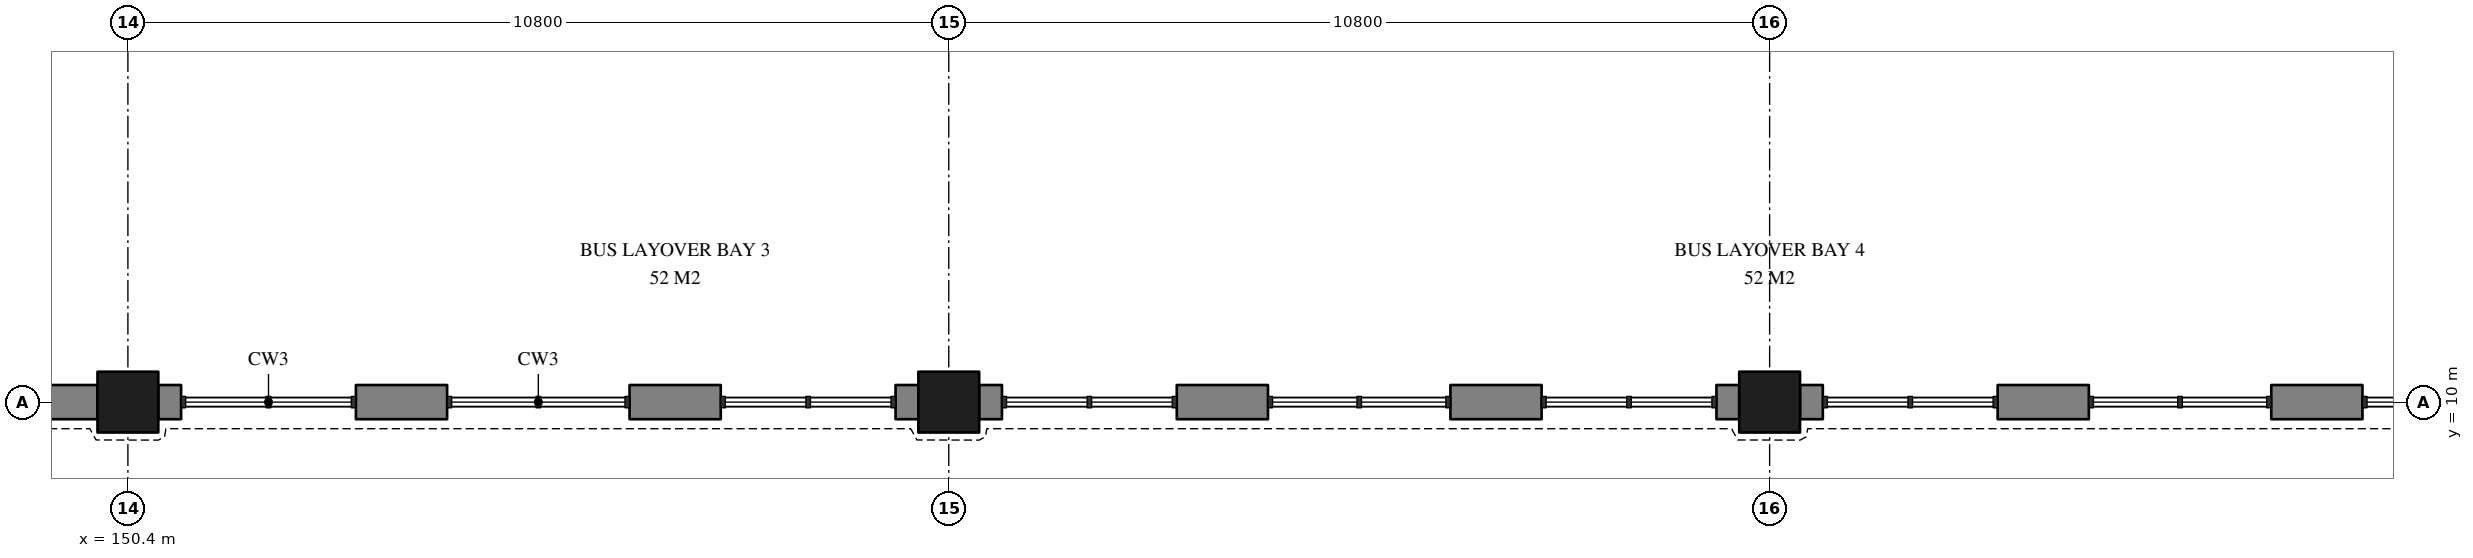
"""IFC4 building model, lengths in metres.
Left out: names, types, materials, properties, quantities, classifications, styles, units other than length and angle.
Written with IfcOpenShell. Run it as: python <this file> out.ifc"""

import sys

from ifc_helpers import new_model, si_unit, direction, frame, frame_2d, origin, origin_2d, place, context, subcontext, project, spatial, rectangle, extrude, element, save


model = new_model("IFC4")
c1 = context("Model", 3, precision=1e-05, world=origin(), true_north=direction((0.0, 1.0)))
c2 = subcontext(c1, "Body", "Model", "MODEL_VIEW")
j1 = project(units=[si_unit("LENGTHUNIT", "METRE"), si_unit("PLANEANGLEUNIT", "RADIAN")], contexts=[c1])
p1 = place(None, origin())
s1 = spatial("IfcSite", under=j1, at=p1, CompositionType="ELEMENT")
p2 = place(p1, origin())
s2 = spatial("IfcBuilding", under=s1, at=p2, CompositionType="ELEMENT")
p3 = place(p2, frame((0.0, 0.0, -5.4)))
s3 = spatial("IfcBuildingStorey", under=s2, at=p3, CompositionType="ELEMENT", Elevation=-5.4)
for number, where, z_axis, x_axis in (
    (1, (150.4, 10.0, -0.4), (0.0, 0.0, 1.0), (1.0, 0.0, 0.0)),
    (2, (161.2, 10.0, -0.4), (0.0, 0.0, 1.0), (1.0, 0.0, 0.0)),
    (3, (172.0, 10.0, -0.4), (0.0, 0.0, 1.0), (1.0, 0.0, 0.0)),
):
    element("IfcColumn", number, at=place(p3, frame(where, z_axis=z_axis, x_axis=x_axis)), inside=s3, PredefinedType="COLUMN", context=c2, shape_type="SweptSolid", body=[
        extrude(rectangle(XDim=0.8, YDim=0.8, at=origin_2d()), origin(), (0.0, 0.0, 1.0), 5.8),
    ])
p4 = place(p3, frame((148.6, 10.0, 0.0), z_axis=(0.0, 0.0, 1.0), x_axis=(1.0, 0.0, 0.0)))
e4 = element("IfcWall", 4, at=p4, inside=s3, PredefinedType="SOLIDWALL", context=c2, shape_type="SweptSolid", body=[
    extrude(rectangle(XDim=1.4, YDim=0.45, at=frame_2d((0.7, 0.0))), origin(), (0.0, 0.0, 1.0), 3.8),
])
p5 = place(p3, frame((150.8, 10.0, 0.0), z_axis=(0.0, 0.0, 1.0), x_axis=(1.0, 0.0, 0.0)))
e5 = element("IfcWall", 5, at=p5, inside=s3, PredefinedType="SOLIDWALL", context=c2, shape_type="SweptSolid", body=[
    extrude(rectangle(XDim=0.3, YDim=0.45, at=frame_2d((0.15, 0.0))), origin(), (0.0, 0.0, 1.0), 4.8),
])
p6 = place(p3, frame((153.4, 10.0, 0.0), z_axis=(0.0, 0.0, 1.0), x_axis=(1.0, 0.0, 0.0)))
e6 = element("IfcWall", 6, at=p6, inside=s3, PredefinedType="SOLIDWALL", context=c2, shape_type="SweptSolid", body=[
    extrude(rectangle(XDim=1.2, YDim=0.45, at=frame_2d((0.6, 0.0))), origin(), (0.0, 0.0, 1.0), 3.8),
])
p7 = place(p3, frame((157.0, 10.0, 0.0), z_axis=(0.0, 0.0, 1.0), x_axis=(1.0, 0.0, 0.0)))
e7 = element("IfcWall", 7, at=p7, inside=s3, PredefinedType="SOLIDWALL", context=c2, shape_type="SweptSolid", body=[
    extrude(rectangle(XDim=1.2, YDim=0.45, at=frame_2d((0.6, 0.0))), origin(), (0.0, 0.0, 1.0), 3.8),
])
p8 = place(p3, frame((160.5, 10.0, 0.0), z_axis=(0.0, 0.0, 1.0), x_axis=(1.0, 0.0, 0.0)))
e8 = element("IfcWall", 8, at=p8, inside=s3, PredefinedType="SOLIDWALL", context=c2, shape_type="SweptSolid", body=[
    extrude(rectangle(XDim=0.3, YDim=0.45, at=frame_2d((0.15, 0.0))), origin(), (0.0, 0.0, 1.0), 4.8),
])
p9 = place(p3, frame((161.6, 10.0, 0.0), z_axis=(0.0, 0.0, 1.0), x_axis=(1.0, 0.0, 0.0)))
e9 = element("IfcWall", 9, at=p9, inside=s3, PredefinedType="SOLIDWALL", context=c2, shape_type="SweptSolid", body=[
    extrude(rectangle(XDim=0.3, YDim=0.45, at=frame_2d((0.15, 0.0))), origin(), (0.0, 0.0, 1.0), 3.8),
])
for number, where, z_axis, x_axis in (
    (10, (164.2, 10.0, 0.0), (0.0, 0.0, 1.0), (1.0, 0.0, 0.0)),
    (11, (167.8, 10.0, 0.0), (0.0, 0.0, 1.0), (1.0, 0.0, 0.0)),
):
    element("IfcWall", number, at=place(p3, frame(where, z_axis=z_axis, x_axis=x_axis)), inside=s3, PredefinedType="SOLIDWALL", context=c2, shape_type="SweptSolid", body=[
        extrude(rectangle(XDim=1.2, YDim=0.45, at=frame_2d((0.6, 0.0))), origin(), (0.0, 0.0, 1.0), 3.8),
    ])
p10 = place(p3, frame((171.3, 10.0, 0.0), z_axis=(0.0, 0.0, 1.0), x_axis=(1.0, 0.0, 0.0)))
e12 = element("IfcWall", 12, at=p10, inside=s3, PredefinedType="SOLIDWALL", context=c2, shape_type="SweptSolid", body=[
    extrude(rectangle(XDim=0.3, YDim=0.45, at=frame_2d((0.15, 0.0))), origin(), (0.0, 0.0, 1.0), 4.8),
])
p11 = place(p3, frame((172.4, 10.0, 0.0), z_axis=(0.0, 0.0, 1.0), x_axis=(1.0, 0.0, 0.0)))
e13 = element("IfcWall", 13, at=p11, inside=s3, PredefinedType="SOLIDWALL", context=c2, shape_type="SweptSolid", body=[
    extrude(rectangle(XDim=0.3, YDim=0.45, at=frame_2d((0.15, 0.0))), origin(), (0.0, 0.0, 1.0), 3.8),
])
for number, where, z_axis, x_axis in (
    (14, (175.0, 10.0, 0.0), (0.0, 0.0, 1.0), (1.0, 0.0, 0.0)),
    (15, (178.6, 10.0, 0.0), (0.0, 0.0, 1.0), (1.0, 0.0, 0.0)),
):
    element("IfcWall", number, at=place(p3, frame(where, z_axis=z_axis, x_axis=x_axis)), inside=s3, PredefinedType="SOLIDWALL", context=c2, shape_type="SweptSolid", body=[
        extrude(rectangle(XDim=1.2, YDim=0.45, at=frame_2d((0.6, 0.0))), origin(), (0.0, 0.0, 1.0), 3.8),
    ])
save(model, sys.argv[1])
